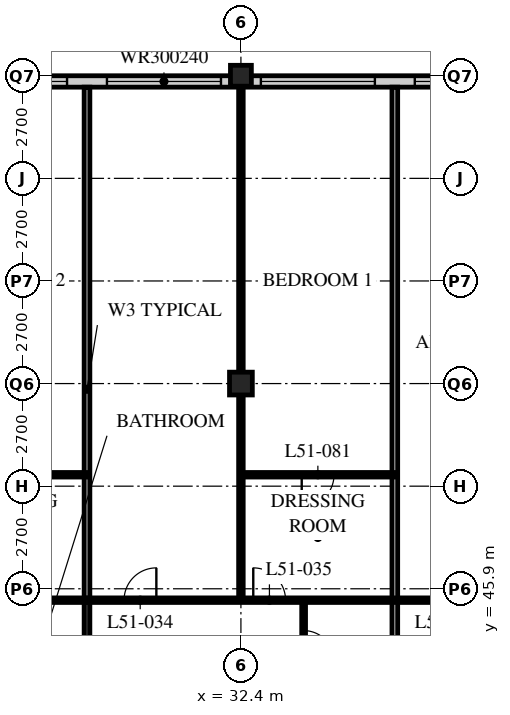
"""IFC4 building model, lengths in metres.
Left out: names, types, materials, properties, quantities, classifications, styles, units other than length and angle.
Written with IfcOpenShell. Run it as: python <this file> out.ifc"""

import sys

from ifc_helpers import new_model, si_unit, direction, frame, frame_2d, origin, origin_2d, place, context, subcontext, project, spatial, rectangle, hollow_rectangle, extrude, element, fill, save


model = new_model("IFC4")
c1 = context("Model", 3, precision=1e-05, world=origin(), true_north=direction((0.0, 1.0)))
c2 = subcontext(c1, "Body", "Model", "MODEL_VIEW")
j1 = project(units=[si_unit("LENGTHUNIT", "METRE"), si_unit("PLANEANGLEUNIT", "RADIAN")], contexts=[c1])
p1 = place(None, origin())
s1 = spatial("IfcSite", under=j1, at=p1, CompositionType="ELEMENT")
p2 = place(p1, origin())
s2 = spatial("IfcBuilding", under=s1, at=p2, CompositionType="ELEMENT")
p3 = place(p2, frame((0.0, 0.0, 199.2)))
s3 = spatial("IfcBuildingStorey", under=s2, at=p3, CompositionType="ELEMENT", Elevation=199.2)
p4 = place(p3, frame((32.4, 51.3, 0.0), z_axis=(0.0, 0.0, 1.0), x_axis=(1.0, 0.0, 0.0)))
e1 = element("IfcColumn", 1, at=p4, inside=s3, PredefinedType="COLUMN", context=c2, shape_type="SweptSolid", body=[
    extrude(hollow_rectangle(XDim=0.6, YDim=0.6, WallThickness=0.05, at=origin_2d()), origin(), (0.0, 0.0, 1.0), 3.6),
])
p5 = place(p3, frame((32.4, 59.4, 0.0), z_axis=(0.0, 0.0, 1.0), x_axis=(1.0, 0.0, 0.0)))
e2 = element("IfcColumn", 2, at=p5, inside=s3, PredefinedType="COLUMN", context=c2, shape_type="SweptSolid", body=[
    extrude(hollow_rectangle(XDim=0.55, YDim=0.55, WallThickness=0.045, at=origin_2d()), origin(), (0.0, 0.0, 1.0), 3.6),
])
p6 = place(p3, frame((48.3, 59.25, 0.0), z_axis=(0.0, 0.0, 1.0), x_axis=(-1.0, 0.0, 0.0)))
e3 = element("IfcWall", 3, at=p6, inside=s3, PredefinedType="SOLIDWALL", context=c2, shape_type="SweptSolid", body=[
    extrude(rectangle(XDim=40.2, YDim=0.3, at=frame_2d((20.1, 0.0))), origin(), (0.0, 0.0, 1.0), 3.39),
])
p7 = place(p6, frame((0.225, 0.0, 0.6)))
e4 = element("IfcOpeningElement", 4, at=p7, cuts=e3, PredefinedType="OPENING", context=c2, shape_type="SweptSolid", body=[
    extrude(rectangle(XDim=3.0, YDim=2.4, at=frame_2d((1.5, 1.2))), frame((0.0, 0.16, 0.0), z_axis=(0.0, -1.0, 0.0), x_axis=(1.0, 0.0, 0.0)), (0.0, 0.0, 1.0), 0.32),
])
p8 = place(p6, frame((4.275, 0.0, 0.6)))
e5 = element("IfcOpeningElement", 5, at=p8, cuts=e3, PredefinedType="OPENING", context=c2, shape_type="SweptSolid", body=[
    extrude(rectangle(XDim=3.0, YDim=2.4, at=frame_2d((1.5, 1.2))), frame((0.0, 0.16, 0.0), z_axis=(0.0, -1.0, 0.0), x_axis=(1.0, 0.0, 0.0)), (0.0, 0.0, 1.0), 0.32),
])
p9 = place(p6, frame((8.325, 0.0, 0.6)))
e6 = element("IfcOpeningElement", 6, at=p9, cuts=e3, PredefinedType="OPENING", context=c2, shape_type="SweptSolid", body=[
    extrude(rectangle(XDim=3.0, YDim=2.4, at=frame_2d((1.5, 1.2))), frame((0.0, 0.16, 0.0), z_axis=(0.0, -1.0, 0.0), x_axis=(1.0, 0.0, 0.0)), (0.0, 0.0, 1.0), 0.32),
])
p10 = place(p6, frame((12.375, 0.0, 0.6)))
e7 = element("IfcOpeningElement", 7, at=p10, cuts=e3, PredefinedType="OPENING", context=c2, shape_type="SweptSolid", body=[
    extrude(rectangle(XDim=3.0, YDim=2.4, at=frame_2d((1.5, 1.2))), frame((0.0, 0.16, 0.0), z_axis=(0.0, -1.0, 0.0), x_axis=(1.0, 0.0, 0.0)), (0.0, 0.0, 1.0), 0.32),
])
p11 = place(p6, frame((16.425, 0.0, 0.6)))
e8 = element("IfcOpeningElement", 8, at=p11, cuts=e3, PredefinedType="OPENING", context=c2, shape_type="SweptSolid", body=[
    extrude(rectangle(XDim=3.0, YDim=2.4, at=frame_2d((1.5, 1.2))), frame((0.0, 0.16, 0.0), z_axis=(0.0, -1.0, 0.0), x_axis=(1.0, 0.0, 0.0)), (0.0, 0.0, 1.0), 0.32),
])
p12 = place(p6, frame((20.475, 0.0, 0.6)))
e9 = element("IfcOpeningElement", 9, at=p12, cuts=e3, PredefinedType="OPENING", context=c2, shape_type="SweptSolid", body=[
    extrude(rectangle(XDim=3.0, YDim=2.4, at=frame_2d((1.5, 1.2))), frame((0.0, 0.16, 0.0), z_axis=(0.0, -1.0, 0.0), x_axis=(1.0, 0.0, 0.0)), (0.0, 0.0, 1.0), 0.32),
])
p13 = place(p6, frame((24.525, 0.0, 0.6)))
e10 = element("IfcOpeningElement", 10, at=p13, cuts=e3, PredefinedType="OPENING", context=c2, shape_type="SweptSolid", body=[
    extrude(rectangle(XDim=3.0, YDim=2.4, at=frame_2d((1.5, 1.2))), frame((0.0, 0.16, 0.0), z_axis=(0.0, -1.0, 0.0), x_axis=(1.0, 0.0, 0.0)), (0.0, 0.0, 1.0), 0.32),
])
p14 = place(p6, frame((28.575, 0.0, 0.6)))
e11 = element("IfcOpeningElement", 11, at=p14, cuts=e3, PredefinedType="OPENING", context=c2, shape_type="SweptSolid", body=[
    extrude(rectangle(XDim=3.0, YDim=2.4, at=frame_2d((1.5, 1.2))), frame((0.0, 0.16, 0.0), z_axis=(0.0, -1.0, 0.0), x_axis=(1.0, 0.0, 0.0)), (0.0, 0.0, 1.0), 0.32),
])
p15 = place(p6, frame((32.625, 0.0, 0.6)))
e12 = element("IfcOpeningElement", 12, at=p15, cuts=e3, PredefinedType="OPENING", context=c2, shape_type="SweptSolid", body=[
    extrude(rectangle(XDim=3.0, YDim=2.4, at=frame_2d((1.5, 1.2))), frame((0.0, 0.16, 0.0), z_axis=(0.0, -1.0, 0.0), x_axis=(1.0, 0.0, 0.0)), (0.0, 0.0, 1.0), 0.32),
])
p16 = place(p6, frame((36.675, 0.0, 0.6)))
e13 = element("IfcOpeningElement", 13, at=p16, cuts=e3, PredefinedType="OPENING", context=c2, shape_type="SweptSolid", body=[
    extrude(rectangle(XDim=3.0, YDim=2.4, at=frame_2d((1.5, 1.2))), frame((0.0, 0.16, 0.0), z_axis=(0.0, -1.0, 0.0), x_axis=(1.0, 0.0, 0.0)), (0.0, 0.0, 1.0), 0.32),
])
p17 = place(p3, frame((28.35, 43.2, 0.0), z_axis=(0.0, 0.0, 1.0), x_axis=(0.0, 1.0, 0.0)))
e14 = element("IfcWall", 14, at=p17, inside=s3, PredefinedType="PARTITIONING", context=c2, shape_type="SweptSolid", body=[
    extrude(rectangle(XDim=15.9, YDim=0.15, at=frame_2d((7.95, 0.0))), origin(), (0.0, 0.0, 1.0), 3.39),
])
p18 = place(p3, frame((34.05, 43.2, 0.0), z_axis=(0.0, 0.0, 1.0), x_axis=(0.0, 1.0, 0.0)))
e15 = element("IfcWall", 15, at=p18, inside=s3, PredefinedType="PARTITIONING", context=c2, shape_type="SweptSolid", body=[
    extrude(rectangle(XDim=2.4, YDim=0.1, at=frame_2d((1.2, 0.0))), origin(), (0.0, 0.0, 1.0), 3.39),
])
p19 = place(p18, frame((0.8, 0.0, 0.0)))
e16 = element("IfcOpeningElement", 16, at=p19, cuts=e15, PredefinedType="OPENING", context=c2, shape_type="SweptSolid", body=[
    extrude(rectangle(XDim=0.8, YDim=2.1, at=frame_2d((0.4, 1.05))), frame((0.0, 0.06, 0.0), z_axis=(0.0, -1.0, 0.0), x_axis=(1.0, 0.0, 0.0)), (0.0, 0.0, 1.0), 0.12),
])
p20 = place(p3, frame((32.4, 45.6, 0.0), z_axis=(0.0, 0.0, 1.0), x_axis=(0.0, 1.0, 0.0)))
e17 = element("IfcWall", 17, at=p20, inside=s3, PredefinedType="PARTITIONING", context=c2, shape_type="SweptSolid", body=[
    extrude(rectangle(XDim=13.5, YDim=0.12, at=frame_2d((6.75, 0.0))), origin(), (0.0, 0.0, 1.0), 2.778),
])
p21 = place(p3, frame((36.45, 43.2, 0.0), z_axis=(0.0, 0.0, 1.0), x_axis=(0.0, 1.0, 0.0)))
e18 = element("IfcWall", 18, at=p21, inside=s3, PredefinedType="PARTITIONING", context=c2, shape_type="SweptSolid", body=[
    extrude(rectangle(XDim=15.9, YDim=0.15, at=frame_2d((7.95, 0.0))), origin(), (0.0, 0.0, 1.0), 3.39),
])
p22 = place(p3, frame((4.1, 45.6, 0.0), z_axis=(0.0, 0.0, 1.0), x_axis=(1.0, 0.0, 0.0)))
e19 = element("IfcWall", 19, at=p22, inside=s3, PredefinedType="PARTITIONING", context=c2, shape_type="SweptSolid", body=[
    extrude(rectangle(XDim=48.5, YDim=0.12, at=frame_2d((24.25, 0.0))), origin(), (0.0, 0.0, 1.0), 3.39),
])
p23 = place(p22, frame((9.025, 0.0, 0.0)))
e20 = element("IfcOpeningElement", 20, at=p23, cuts=e19, PredefinedType="OPENING", context=c2, shape_type="SweptSolid", body=[
    extrude(rectangle(XDim=0.85, YDim=2.1, at=frame_2d((0.425, 1.05))), frame((0.0, 0.07, 0.0), z_axis=(0.0, -1.0, 0.0), x_axis=(1.0, 0.0, 0.0)), (0.0, 0.0, 1.0), 0.14),
])
p24 = place(p22, frame((16.475, 0.0, 0.0)))
e21 = element("IfcOpeningElement", 21, at=p24, cuts=e19, PredefinedType="OPENING", context=c2, shape_type="SweptSolid", body=[
    extrude(rectangle(XDim=0.85, YDim=2.1, at=frame_2d((0.425, 1.05))), frame((0.0, 0.07, 0.0), z_axis=(0.0, -1.0, 0.0), x_axis=(1.0, 0.0, 0.0)), (0.0, 0.0, 1.0), 0.14),
])
p25 = place(p22, frame((20.525, 0.0, 0.0)))
e22 = element("IfcOpeningElement", 22, at=p25, cuts=e19, PredefinedType="OPENING", context=c2, shape_type="SweptSolid", body=[
    extrude(rectangle(XDim=0.85, YDim=2.1, at=frame_2d((0.425, 1.05))), frame((0.0, 0.07, 0.0), z_axis=(0.0, -1.0, 0.0), x_axis=(1.0, 0.0, 0.0)), (0.0, 0.0, 1.0), 0.14),
])
p26 = place(p22, frame((25.225, 0.0, 0.0)))
e23 = element("IfcOpeningElement", 23, at=p26, cuts=e19, PredefinedType="OPENING", context=c2, shape_type="SweptSolid", body=[
    extrude(rectangle(XDim=0.85, YDim=2.1, at=frame_2d((0.425, 1.05))), frame((0.0, 0.07, 0.0), z_axis=(0.0, -1.0, 0.0), x_axis=(1.0, 0.0, 0.0)), (0.0, 0.0, 1.0), 0.14),
])
p27 = place(p22, frame((28.625, 0.0, 0.0)))
e24 = element("IfcOpeningElement", 24, at=p27, cuts=e19, PredefinedType="OPENING", context=c2, shape_type="SweptSolid", body=[
    extrude(rectangle(XDim=0.85, YDim=2.1, at=frame_2d((0.425, 1.05))), frame((0.0, 0.07, 0.0), z_axis=(0.0, -1.0, 0.0), x_axis=(1.0, 0.0, 0.0)), (0.0, 0.0, 1.0), 0.14),
])
p28 = place(p22, frame((33.325, 0.0, 0.0)))
e25 = element("IfcOpeningElement", 25, at=p28, cuts=e19, PredefinedType="OPENING", context=c2, shape_type="SweptSolid", body=[
    extrude(rectangle(XDim=0.85, YDim=2.1, at=frame_2d((0.425, 1.05))), frame((0.0, 0.07, 0.0), z_axis=(0.0, -1.0, 0.0), x_axis=(1.0, 0.0, 0.0)), (0.0, 0.0, 1.0), 0.14),
])
p29 = place(p22, frame((36.725, 0.0, 0.0)))
e26 = element("IfcOpeningElement", 26, at=p29, cuts=e19, PredefinedType="OPENING", context=c2, shape_type="SweptSolid", body=[
    extrude(rectangle(XDim=0.85, YDim=2.1, at=frame_2d((0.425, 1.05))), frame((0.0, 0.07, 0.0), z_axis=(0.0, -1.0, 0.0), x_axis=(1.0, 0.0, 0.0)), (0.0, 0.0, 1.0), 0.14),
])
p30 = place(p22, frame((40.925, 0.0, 0.0)))
e27 = element("IfcOpeningElement", 27, at=p30, cuts=e19, PredefinedType="OPENING", context=c2, shape_type="SweptSolid", body=[
    extrude(rectangle(XDim=0.85, YDim=2.1, at=frame_2d((0.425, 1.05))), frame((0.0, 0.07, 0.0), z_axis=(0.0, -1.0, 0.0), x_axis=(1.0, 0.0, 0.0)), (0.0, 0.0, 1.0), 0.14),
])
p31 = place(p22, frame((44.775, 0.0, 0.0)))
e28 = element("IfcOpeningElement", 28, at=p31, cuts=e19, PredefinedType="OPENING", context=c2, shape_type="SweptSolid", body=[
    extrude(rectangle(XDim=0.85, YDim=2.1, at=frame_2d((0.425, 1.05))), frame((0.0, 0.07, 0.0), z_axis=(0.0, -1.0, 0.0), x_axis=(1.0, 0.0, 0.0)), (0.0, 0.0, 1.0), 0.14),
])
p32 = place(p22, frame((6.725, 0.0, 0.0)))
e29 = element("IfcOpeningElement", 29, at=p32, cuts=e19, PredefinedType="OPENING", context=c2, shape_type="SweptSolid", body=[
    extrude(rectangle(XDim=0.85, YDim=2.1, at=frame_2d((0.425, 1.05))), frame((0.0, 0.07, 0.0), z_axis=(0.0, -1.0, 0.0), x_axis=(1.0, 0.0, 0.0)), (0.0, 0.0, 1.0), 0.14),
])
p33 = place(p22, frame((2.875, 0.0, 0.0)))
e30 = element("IfcOpeningElement", 30, at=p33, cuts=e19, PredefinedType="OPENING", context=c2, shape_type="SweptSolid", body=[
    extrude(rectangle(XDim=0.85, YDim=2.1, at=frame_2d((0.425, 1.05))), frame((0.0, 0.07, 0.0), z_axis=(0.0, -1.0, 0.0), x_axis=(1.0, 0.0, 0.0)), (0.0, 0.0, 1.0), 0.14),
])
p34 = place(p3, frame((24.3, 48.9, 0.0), z_axis=(0.0, 0.0, 1.0), x_axis=(1.0, 0.0, 0.0)))
e31 = element("IfcWall", 31, at=p34, inside=s3, PredefinedType="PARTITIONING", context=c2, shape_type="SweptSolid", body=[
    extrude(rectangle(XDim=4.05, YDim=0.12, at=frame_2d((2.025, 0.0))), origin(), (0.0, 0.0, 1.0), 3.39),
])
p35 = place(p34, frame((1.6, 0.0, 0.0)))
e32 = element("IfcOpeningElement", 32, at=p35, cuts=e31, PredefinedType="OPENING", context=c2, shape_type="SweptSolid", body=[
    extrude(rectangle(XDim=0.85, YDim=2.1, at=frame_2d((0.425, 1.05))), frame((0.0, 0.07, 0.0), z_axis=(0.0, -1.0, 0.0), x_axis=(1.0, 0.0, 0.0)), (0.0, 0.0, 1.0), 0.14),
])
p36 = place(p3, frame((32.4, 48.9, 0.0), z_axis=(0.0, 0.0, 1.0), x_axis=(1.0, 0.0, 0.0)))
e33 = element("IfcWall", 33, at=p36, inside=s3, PredefinedType="PARTITIONING", context=c2, shape_type="SweptSolid", body=[
    extrude(rectangle(XDim=4.05, YDim=0.12, at=frame_2d((2.025, 0.0))), origin(), (0.0, 0.0, 1.0), 3.39),
])
p37 = place(p36, frame((1.6, 0.0, 0.0)))
e34 = element("IfcOpeningElement", 34, at=p37, cuts=e33, PredefinedType="OPENING", context=c2, shape_type="SweptSolid", body=[
    extrude(rectangle(XDim=0.85, YDim=2.1, at=frame_2d((0.425, 1.05))), frame((0.0, 0.07, 0.0), z_axis=(0.0, -1.0, 0.0), x_axis=(1.0, 0.0, 0.0)), (0.0, 0.0, 1.0), 0.14),
])
p38 = place(p9, origin())
e35 = element("IfcWindow", 35, at=p38, inside=s3, PartitioningType="SINGLE_PANEL", PredefinedType="WINDOW", context=c2, shape_type="SweptSolid", body=[
    extrude(rectangle(XDim=3.0, YDim=2.4, at=frame_2d((1.5, 1.2))), frame((0.0, 0.03, 0.0), z_axis=(0.0, -1.0, 0.0), x_axis=(1.0, 0.0, 0.0)), (0.0, 0.0, 1.0), 0.06),
])
fill(e6, e35)
p39 = place(p10, origin())
e36 = element("IfcWindow", 36, at=p39, inside=s3, PartitioningType="SINGLE_PANEL", PredefinedType="WINDOW", context=c2, shape_type="SweptSolid", body=[
    extrude(rectangle(XDim=3.0, YDim=2.4, at=frame_2d((1.5, 1.2))), frame((0.0, 0.03, 0.0), z_axis=(0.0, -1.0, 0.0), x_axis=(1.0, 0.0, 0.0)), (0.0, 0.0, 1.0), 0.06),
])
fill(e7, e36)
p40 = place(p11, origin())
e37 = element("IfcWindow", 37, at=p40, inside=s3, PartitioningType="SINGLE_PANEL", PredefinedType="WINDOW", context=c2, shape_type="SweptSolid", body=[
    extrude(rectangle(XDim=3.0, YDim=2.4, at=frame_2d((1.5, 1.2))), frame((0.0, 0.03, 0.0), z_axis=(0.0, -1.0, 0.0), x_axis=(1.0, 0.0, 0.0)), (0.0, 0.0, 1.0), 0.06),
])
fill(e8, e37)
p41 = place(p12, origin())
e38 = element("IfcWindow", 38, at=p41, inside=s3, PartitioningType="SINGLE_PANEL", PredefinedType="WINDOW", context=c2, shape_type="SweptSolid", body=[
    extrude(rectangle(XDim=3.0, YDim=2.4, at=frame_2d((1.5, 1.2))), frame((0.0, 0.03, 0.0), z_axis=(0.0, -1.0, 0.0), x_axis=(1.0, 0.0, 0.0)), (0.0, 0.0, 1.0), 0.06),
])
fill(e9, e38)
p42 = place(p19, origin())
e39 = element("IfcDoor", 39, at=p42, inside=s3, OperationType="SINGLE_SWING_RIGHT", PredefinedType="DOOR", context=c2, shape_type="SweptSolid", body=[
    extrude(rectangle(XDim=0.8, YDim=2.1, at=frame_2d((0.4, 1.05))), frame((0.0, 0.025, 0.0), z_axis=(0.0, -1.0, 0.0), x_axis=(1.0, 0.0, 0.0)), (0.0, 0.0, 1.0), 0.05),
])
fill(e16, e39)
p43 = place(p26, origin())
e40 = element("IfcDoor", 40, at=p43, inside=s3, OperationType="SINGLE_SWING_RIGHT", PredefinedType="DOOR", context=c2, shape_type="SweptSolid", body=[
    extrude(rectangle(XDim=0.85, YDim=2.1, at=frame_2d((0.425, 1.05))), frame((0.0, 0.025, 0.0), z_axis=(0.0, -1.0, 0.0), x_axis=(1.0, 0.0, 0.0)), (0.0, 0.0, 1.0), 0.05),
])
fill(e23, e40)
p44 = place(p27, origin())
e41 = element("IfcDoor", 41, at=p44, inside=s3, OperationType="SINGLE_SWING_LEFT", PredefinedType="DOOR", context=c2, shape_type="SweptSolid", body=[
    extrude(rectangle(XDim=0.85, YDim=2.1, at=frame_2d((0.425, 1.05))), frame((0.0, 0.025, 0.0), z_axis=(0.0, -1.0, 0.0), x_axis=(1.0, 0.0, 0.0)), (0.0, 0.0, 1.0), 0.05),
])
fill(e24, e41)
p45 = place(p37, origin())
e42 = element("IfcDoor", 42, at=p45, inside=s3, OperationType="SINGLE_SWING_RIGHT", PredefinedType="DOOR", context=c2, shape_type="SweptSolid", body=[
    extrude(rectangle(XDim=0.85, YDim=2.1, at=frame_2d((0.425, 1.05))), frame((0.0, 0.025, 0.0), z_axis=(0.0, -1.0, 0.0), x_axis=(1.0, 0.0, 0.0)), (0.0, 0.0, 1.0), 0.05),
])
fill(e34, e42)
save(model, sys.argv[1])
